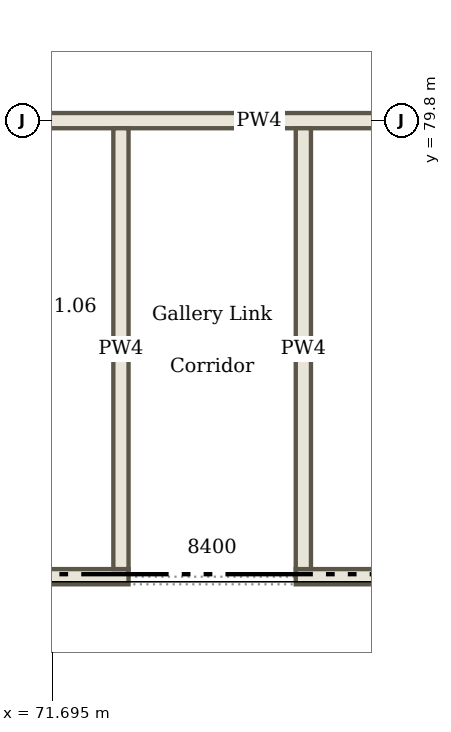
"""IFC4 building model, lengths in metres.
Left out: names, types, materials, properties, quantities, classifications, styles, units other than length and angle.
Written with IfcOpenShell. Run it as: python <this file> out.ifc"""

import sys

from ifc_helpers import new_model, si_unit, direction, frame, frame_2d, origin, place, context, subcontext, project, spatial, rectangle, extrude, element, save


model = new_model("IFC4")
c1 = context("Model", 3, precision=1e-05, world=origin(), true_north=direction((0.0, 1.0)))
c2 = subcontext(c1, "Body", "Model", "MODEL_VIEW")
j1 = project(units=[si_unit("LENGTHUNIT", "METRE"), si_unit("PLANEANGLEUNIT", "RADIAN")], contexts=[c1])
p1 = place(None, origin())
s1 = spatial("IfcSite", under=j1, at=p1, CompositionType="ELEMENT")
p2 = place(p1, origin())
s2 = spatial("IfcBuilding", under=s1, at=p2, CompositionType="ELEMENT")
p3 = place(p2, frame((0.0, 0.0, 4.5)))
s3 = spatial("IfcBuildingStorey", under=s2, at=p3, CompositionType="ELEMENT", Elevation=4.5)
p4 = place(p3, frame((60.3, 73.8, 0.0), z_axis=(0.0, 0.0, 1.0), x_axis=(1.0, 0.0, 0.0)))
e1 = element("IfcWall", 1, at=p4, inside=s3, PredefinedType="PARTITIONING", context=c2, shape_type="SweptSolid", body=[
    extrude(rectangle(XDim=12.4, YDim=0.2, at=frame_2d((6.2, 0.0))), origin(), (0.0, 0.0, 1.0), 4.2),
])
p5 = place(p3, frame((74.9, 73.8, 0.0), z_axis=(0.0, 0.0, 1.0), x_axis=(1.0, 0.0, 0.0)))
e2 = element("IfcWall", 2, at=p5, inside=s3, PredefinedType="PARTITIONING", context=c2, shape_type="SweptSolid", body=[
    extrude(rectangle(XDim=16.2, YDim=0.2, at=frame_2d((8.1, 0.0))), origin(), (0.0, 0.0, 1.0), 4.2),
])
p6 = place(p3, frame((69.8, 79.8, 0.0), z_axis=(0.0, 0.0, 1.0), x_axis=(1.0, 0.0, 0.0)))
e3 = element("IfcWall", 3, at=p6, inside=s3, PredefinedType="PARTITIONING", context=c2, shape_type="SweptSolid", body=[
    extrude(rectangle(XDim=8.0, YDim=0.2, at=frame_2d((4.0, 0.0))), origin(), (0.0, 0.0, 1.0), 3.781),
])
p7 = place(p6, frame((0.233, 0.0, 0.0)))
e4 = element("IfcOpeningElement", 4, at=p7, cuts=e3, PredefinedType="OPENING", context=c2, shape_type="SweptSolid", body=[
    extrude(rectangle(XDim=1.0, YDim=2.1, at=frame_2d((0.5, 1.05))), frame((0.0, 0.11, 0.0), z_axis=(0.0, -1.0, 0.0), x_axis=(1.0, 0.0, 0.0)), (0.0, 0.0, 1.0), 0.22),
])
for number, where, z_axis, x_axis in (
    (5, (72.6, 73.9, 0.0), (0.0, 0.0, 1.0), (0.0, 1.0, 0.0)),
    (6, (75.0, 73.9, 0.0), (0.0, 0.0, 1.0), (0.0, 1.0, 0.0)),
):
    element("IfcWall", number, at=place(p3, frame(where, z_axis=z_axis, x_axis=x_axis)), inside=s3, PredefinedType="PARTITIONING", context=c2, shape_type="SweptSolid", body=[
        extrude(rectangle(XDim=5.8, YDim=0.2, at=frame_2d((2.9, 0.0))), origin(), (0.0, 0.0, 1.0), 3.781),
    ])
save(model, sys.argv[1])
